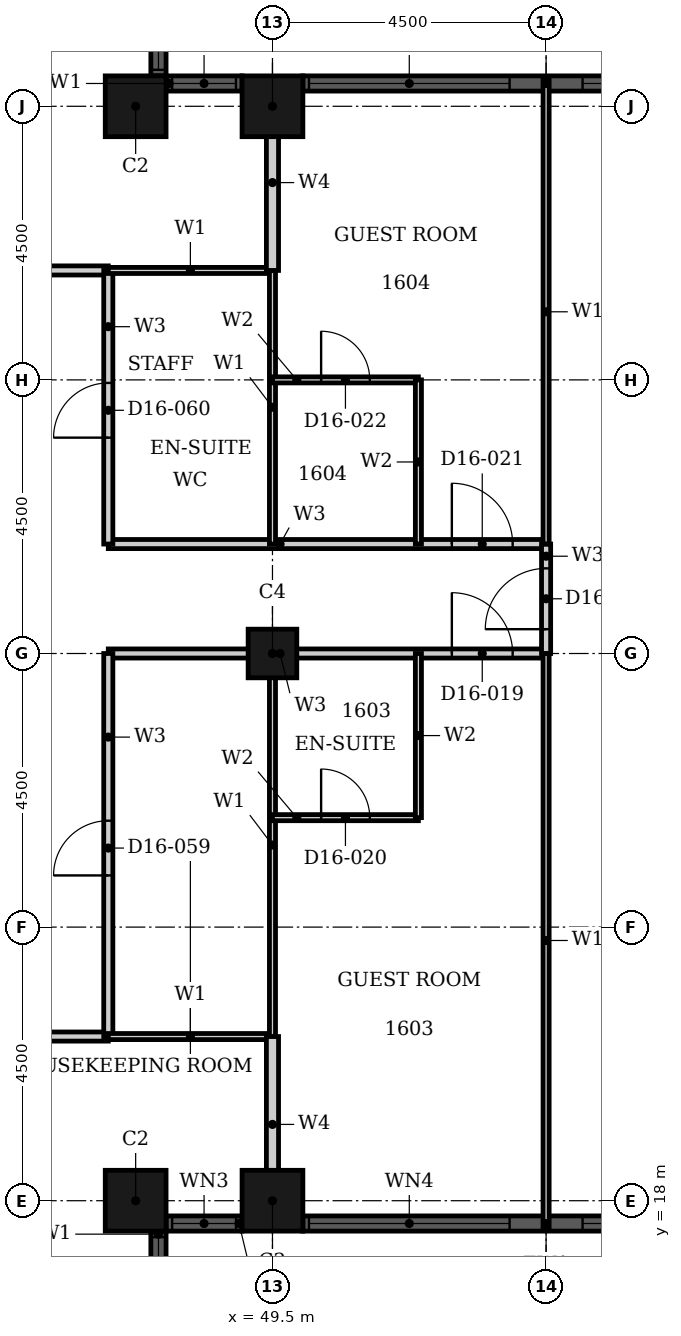
"""IFC4 building model, lengths in metres.
Left out: names, types, materials, properties, quantities, classifications, styles, units other than length and angle.
Written with IfcOpenShell. Run it as: python <this file> out.ifc"""

import sys

from ifc_helpers import new_model, si_unit, direction, frame, frame_2d, origin, origin_2d, place, context, subcontext, project, spatial, rectangle, hollow_rectangle, extrude, element, fill, save


model = new_model("IFC4")
c1 = context("Model", 3, precision=1e-05, world=origin(), true_north=direction((0.0, 1.0)))
c2 = subcontext(c1, "Body", "Model", "MODEL_VIEW")
j1 = project(units=[si_unit("LENGTHUNIT", "METRE"), si_unit("PLANEANGLEUNIT", "RADIAN")], contexts=[c1])
p1 = place(None, origin())
s1 = spatial("IfcSite", under=j1, at=p1, CompositionType="ELEMENT")
p2 = place(p1, origin())
s2 = spatial("IfcBuilding", under=s1, at=p2, CompositionType="ELEMENT")
p3 = place(p2, frame((0.0, 0.0, 70.8)))
s3 = spatial("IfcBuildingStorey", under=s2, at=p3, CompositionType="ELEMENT", Elevation=70.8)
for number, where, z_axis, x_axis in (
    (1, (47.25, 18.0, 0.0), (0.0, 0.0, 1.0), (1.0, 0.0, 0.0)),
    (2, (49.5, 18.0, 0.0), (0.0, 0.0, 1.0), (1.0, 0.0, 0.0)),
    (3, (49.5, 36.0, 0.0), (0.0, 0.0, 1.0), (1.0, 0.0, 0.0)),
    (4, (47.25, 36.0, 0.0), (0.0, 0.0, 1.0), (1.0, 0.0, 0.0)),
):
    element("IfcColumn", number, at=place(p3, frame(where, z_axis=z_axis, x_axis=x_axis)), inside=s3, PredefinedType="COLUMN", context=c2, shape_type="SweptSolid", body=[
        extrude(hollow_rectangle(XDim=1.0, YDim=1.0, WallThickness=0.032, at=origin_2d()), origin(), (0.0, 0.0, 1.0), 3.6),
    ])
p4 = place(p3, frame((49.5, 27.0, 0.0), z_axis=(0.0, 0.0, 1.0), x_axis=(1.0, 0.0, 0.0)))
e5 = element("IfcColumn", 5, at=p4, inside=s3, PredefinedType="COLUMN", context=c2, shape_type="SweptSolid", body=[
    extrude(hollow_rectangle(XDim=0.8, YDim=0.8, WallThickness=0.025, at=origin_2d()), origin(), (0.0, 0.0, 1.0), 3.6),
])
p5 = place(p3, frame((47.625, 16.25, 0.0), z_axis=(0.0, 0.0, 1.0), x_axis=(0.0, 1.0, 0.0)))
e6 = element("IfcWall", 6, at=p5, inside=s3, PredefinedType="SOLIDWALL", context=c2, shape_type="SweptSolid", body=[
    extrude(rectangle(XDim=1.25, YDim=0.25, at=frame_2d((0.625, 0.0))), origin(), (0.0, 0.0, 1.0), 3.6),
])
p6 = place(p5, frame((0.1, 0.0, 0.9)))
e7 = element("IfcOpeningElement", 7, at=p6, cuts=e6, PredefinedType="OPENING", context=c2, shape_type="SweptSolid", body=[
    extrude(rectangle(XDim=1.05, YDim=2.08, at=frame_2d((0.525, 1.04))), frame((0.0, 0.135, 0.0), z_axis=(0.0, -1.0, 0.0), x_axis=(1.0, 0.0, 0.0)), (0.0, 0.0, 1.0), 0.27),
])
p7 = place(p3, frame((47.75, 17.625, 0.0), z_axis=(0.0, 0.0, 1.0), x_axis=(1.0, 0.0, 0.0)))
e8 = element("IfcWall", 8, at=p7, inside=s3, PredefinedType="SOLIDWALL", context=c2, shape_type="SweptSolid", body=[
    extrude(rectangle(XDim=1.25, YDim=0.25, at=frame_2d((0.625, 0.0))), origin(), (0.0, 0.0, 1.0), 3.6),
])
p8 = place(p7, frame((0.1, 0.0, 0.9)))
e9 = element("IfcOpeningElement", 9, at=p8, cuts=e8, PredefinedType="OPENING", context=c2, shape_type="SweptSolid", body=[
    extrude(rectangle(XDim=1.05, YDim=2.08, at=frame_2d((0.525, 1.04))), frame((0.0, 0.135, 0.0), z_axis=(0.0, -1.0, 0.0), x_axis=(1.0, 0.0, 0.0)), (0.0, 0.0, 1.0), 0.27),
])
p9 = place(p3, frame((50.0, 17.625, 0.0), z_axis=(0.0, 0.0, 1.0), x_axis=(1.0, 0.0, 0.0)))
e10 = element("IfcWall", 10, at=p9, inside=s3, PredefinedType="SOLIDWALL", context=c2, shape_type="SweptSolid", body=[
    extrude(rectangle(XDim=8.0, YDim=0.25, at=frame_2d((4.0, 0.0))), origin(), (0.0, 0.0, 1.0), 3.6),
])
p10 = place(p9, frame((0.1, 0.0, 0.9)))
e11 = element("IfcOpeningElement", 11, at=p10, cuts=e10, PredefinedType="OPENING", context=c2, shape_type="SweptSolid", body=[
    extrude(rectangle(XDim=3.3, YDim=2.08, at=frame_2d((1.65, 1.04))), frame((0.0, 0.135, 0.0), z_axis=(0.0, -1.0, 0.0), x_axis=(1.0, 0.0, 0.0)), (0.0, 0.0, 1.0), 0.27),
])
p11 = place(p9, frame((4.6, 0.0, 0.9)))
e12 = element("IfcOpeningElement", 12, at=p11, cuts=e10, PredefinedType="OPENING", context=c2, shape_type="SweptSolid", body=[
    extrude(rectangle(XDim=3.3, YDim=2.08, at=frame_2d((1.65, 1.04))), frame((0.0, 0.135, 0.0), z_axis=(0.0, -1.0, 0.0), x_axis=(1.0, 0.0, 0.0)), (0.0, 0.0, 1.0), 0.27),
])
p12 = place(p3, frame((58.0, 36.375, 0.0), z_axis=(0.0, 0.0, 1.0), x_axis=(-1.0, 0.0, 0.0)))
e13 = element("IfcWall", 13, at=p12, inside=s3, PredefinedType="SOLIDWALL", context=c2, shape_type="SweptSolid", body=[
    extrude(rectangle(XDim=8.0, YDim=0.25, at=frame_2d((4.0, 0.0))), origin(), (0.0, 0.0, 1.0), 3.6),
])
p13 = place(p12, frame((0.1, 0.0, 0.9)))
e14 = element("IfcOpeningElement", 14, at=p13, cuts=e13, PredefinedType="OPENING", context=c2, shape_type="SweptSolid", body=[
    extrude(rectangle(XDim=3.3, YDim=2.08, at=frame_2d((1.65, 1.04))), frame((0.0, 0.135, 0.0), z_axis=(0.0, -1.0, 0.0), x_axis=(1.0, 0.0, 0.0)), (0.0, 0.0, 1.0), 0.27),
])
p14 = place(p12, frame((4.6, 0.0, 0.9)))
e15 = element("IfcOpeningElement", 15, at=p14, cuts=e13, PredefinedType="OPENING", context=c2, shape_type="SweptSolid", body=[
    extrude(rectangle(XDim=3.3, YDim=2.08, at=frame_2d((1.65, 1.04))), frame((0.0, 0.135, 0.0), z_axis=(0.0, -1.0, 0.0), x_axis=(1.0, 0.0, 0.0)), (0.0, 0.0, 1.0), 0.27),
])
p15 = place(p3, frame((49.0, 36.375, 0.0), z_axis=(0.0, 0.0, 1.0), x_axis=(-1.0, 0.0, 0.0)))
e16 = element("IfcWall", 16, at=p15, inside=s3, PredefinedType="SOLIDWALL", context=c2, shape_type="SweptSolid", body=[
    extrude(rectangle(XDim=1.25, YDim=0.25, at=frame_2d((0.625, 0.0))), origin(), (0.0, 0.0, 1.0), 3.6),
])
p16 = place(p15, frame((0.1, 0.0, 0.9)))
e17 = element("IfcOpeningElement", 17, at=p16, cuts=e16, PredefinedType="OPENING", context=c2, shape_type="SweptSolid", body=[
    extrude(rectangle(XDim=1.05, YDim=2.08, at=frame_2d((0.525, 1.04))), frame((0.0, 0.135, 0.0), z_axis=(0.0, -1.0, 0.0), x_axis=(1.0, 0.0, 0.0)), (0.0, 0.0, 1.0), 0.27),
])
p17 = place(p3, frame((47.625, 36.5, 0.0), z_axis=(0.0, 0.0, 1.0), x_axis=(0.0, 1.0, 0.0)))
e18 = element("IfcWall", 18, at=p17, inside=s3, PredefinedType="SOLIDWALL", context=c2, shape_type="SweptSolid", body=[
    extrude(rectangle(XDim=1.25, YDim=0.25, at=frame_2d((0.625, 0.0))), origin(), (0.0, 0.0, 1.0), 3.6),
])
p18 = place(p17, frame((0.1, 0.0, 0.9)))
e19 = element("IfcOpeningElement", 19, at=p18, cuts=e18, PredefinedType="OPENING", context=c2, shape_type="SweptSolid", body=[
    extrude(rectangle(XDim=1.05, YDim=2.08, at=frame_2d((0.525, 1.04))), frame((0.0, 0.135, 0.0), z_axis=(0.0, -1.0, 0.0), x_axis=(1.0, 0.0, 0.0)), (0.0, 0.0, 1.0), 0.27),
])
p19 = place(p3, frame((31.5, 20.7, 0.0), z_axis=(0.0, 0.0, 1.0), x_axis=(1.0, 0.0, 0.0)))
e20 = element("IfcWall", 20, at=p19, inside=s3, PredefinedType="PARTITIONING", context=c2, shape_type="SweptSolid", body=[
    extrude(rectangle(XDim=15.3, YDim=0.15, at=frame_2d((7.65, 0.0))), origin(), (0.0, 0.0, 1.0), 3.3),
])
p20 = place(p19, frame((11.95, 0.0, 0.0)))
e21 = element("IfcOpeningElement", 21, at=p20, cuts=e20, PredefinedType="OPENING", context=c2, shape_type="SweptSolid", body=[
    extrude(rectangle(XDim=1.0, YDim=2.1, at=frame_2d((0.5, 1.05))), frame((0.0, 0.085, 0.0), z_axis=(0.0, -1.0, 0.0), x_axis=(1.0, 0.0, 0.0)), (0.0, 0.0, 1.0), 0.17),
])
p21 = place(p19, frame((4.05, 0.0, 0.0)))
e22 = element("IfcOpeningElement", 22, at=p21, cuts=e20, PredefinedType="OPENING", context=c2, shape_type="SweptSolid", body=[
    extrude(rectangle(XDim=0.9, YDim=2.1, at=frame_2d((0.45, 1.05))), frame((0.0, 0.085, 0.0), z_axis=(0.0, -1.0, 0.0), x_axis=(1.0, 0.0, 0.0)), (0.0, 0.0, 1.0), 0.17),
])
p22 = place(p3, frame((46.8, 27.0, 0.0), z_axis=(0.0, 0.0, 1.0), x_axis=(1.0, 0.0, 0.0)))
e23 = element("IfcWall", 23, at=p22, inside=s3, PredefinedType="PARTITIONING", context=c2, shape_type="SweptSolid", body=[
    extrude(rectangle(XDim=7.2, YDim=0.15, at=frame_2d((3.6, 0.0))), origin(), (0.0, 0.0, 1.0), 2.58),
])
p23 = place(p22, frame((5.65, 0.0, 0.0)))
e24 = element("IfcOpeningElement", 24, at=p23, cuts=e23, PredefinedType="OPENING", context=c2, shape_type="SweptSolid", body=[
    extrude(rectangle(XDim=1.0, YDim=2.1, at=frame_2d((0.5, 1.05))), frame((0.0, 0.085, 0.0), z_axis=(0.0, -1.0, 0.0), x_axis=(1.0, 0.0, 0.0)), (0.0, 0.0, 1.0), 0.17),
])
p24 = place(p3, frame((46.8, 28.8, 0.0), z_axis=(0.0, 0.0, 1.0), x_axis=(1.0, 0.0, 0.0)))
e25 = element("IfcWall", 25, at=p24, inside=s3, PredefinedType="PARTITIONING", context=c2, shape_type="SweptSolid", body=[
    extrude(rectangle(XDim=7.2, YDim=0.15, at=frame_2d((3.6, 0.0))), origin(), (0.0, 0.0, 1.0), 3.3),
])
p25 = place(p24, frame((5.65, 0.0, 0.0)))
e26 = element("IfcOpeningElement", 26, at=p25, cuts=e25, PredefinedType="OPENING", context=c2, shape_type="SweptSolid", body=[
    extrude(rectangle(XDim=1.0, YDim=2.1, at=frame_2d((0.5, 1.05))), frame((0.0, 0.085, 0.0), z_axis=(0.0, -1.0, 0.0), x_axis=(1.0, 0.0, 0.0)), (0.0, 0.0, 1.0), 0.17),
])
p26 = place(p3, frame((33.3, 33.3, 0.0), z_axis=(0.0, 0.0, 1.0), x_axis=(1.0, 0.0, 0.0)))
e27 = element("IfcWall", 27, at=p26, inside=s3, PredefinedType="PARTITIONING", context=c2, shape_type="SweptSolid", body=[
    extrude(rectangle(XDim=13.5, YDim=0.15, at=frame_2d((6.75, 0.0))), origin(), (0.0, 0.0, 1.0), 3.3),
])
p27 = place(p26, frame((10.15, 0.0, 0.0)))
e28 = element("IfcOpeningElement", 28, at=p27, cuts=e27, PredefinedType="OPENING", context=c2, shape_type="SweptSolid", body=[
    extrude(rectangle(XDim=1.0, YDim=2.1, at=frame_2d((0.5, 1.05))), frame((0.0, 0.085, 0.0), z_axis=(0.0, -1.0, 0.0), x_axis=(1.0, 0.0, 0.0)), (0.0, 0.0, 1.0), 0.17),
])
p28 = place(p26, frame((3.15, 0.0, 0.0)))
e29 = element("IfcOpeningElement", 29, at=p28, cuts=e27, PredefinedType="OPENING", context=c2, shape_type="SweptSolid", body=[
    extrude(rectangle(XDim=0.9, YDim=2.1, at=frame_2d((0.45, 1.05))), frame((0.0, 0.085, 0.0), z_axis=(0.0, -1.0, 0.0), x_axis=(1.0, 0.0, 0.0)), (0.0, 0.0, 1.0), 0.17),
])
p29 = place(p3, frame((46.8, 28.8, 0.0), z_axis=(0.0, 0.0, 1.0), x_axis=(0.0, 1.0, 0.0)))
e30 = element("IfcWall", 30, at=p29, inside=s3, PredefinedType="PARTITIONING", context=c2, shape_type="SweptSolid", body=[
    extrude(rectangle(XDim=4.5, YDim=0.15, at=frame_2d((2.25, 0.0))), origin(), (0.0, 0.0, 1.0), 3.3),
])
p30 = place(p29, frame((1.75, 0.0, 0.0)))
e31 = element("IfcOpeningElement", 31, at=p30, cuts=e30, PredefinedType="OPENING", context=c2, shape_type="SweptSolid", body=[
    extrude(rectangle(XDim=0.9, YDim=2.1, at=frame_2d((0.45, 1.05))), frame((0.0, 0.085, 0.0), z_axis=(0.0, -1.0, 0.0), x_axis=(1.0, 0.0, 0.0)), (0.0, 0.0, 1.0), 0.17),
])
p31 = place(p3, frame((46.8, 20.7, 0.0), z_axis=(0.0, 0.0, 1.0), x_axis=(0.0, 1.0, 0.0)))
e32 = element("IfcWall", 32, at=p31, inside=s3, PredefinedType="PARTITIONING", context=c2, shape_type="SweptSolid", body=[
    extrude(rectangle(XDim=6.3, YDim=0.15, at=frame_2d((3.15, 0.0))), origin(), (0.0, 0.0, 1.0), 3.3),
])
p32 = place(p31, frame((2.65, 0.0, 0.0)))
e33 = element("IfcOpeningElement", 33, at=p32, cuts=e32, PredefinedType="OPENING", context=c2, shape_type="SweptSolid", body=[
    extrude(rectangle(XDim=0.9, YDim=2.1, at=frame_2d((0.45, 1.05))), frame((0.0, 0.085, 0.0), z_axis=(0.0, -1.0, 0.0), x_axis=(1.0, 0.0, 0.0)), (0.0, 0.0, 1.0), 0.17),
])
p33 = place(p3, frame((54.0, 27.0, 0.0), z_axis=(0.0, 0.0, 1.0), x_axis=(0.0, 1.0, 0.0)))
e34 = element("IfcWall", 34, at=p33, inside=s3, PredefinedType="PARTITIONING", context=c2, shape_type="SweptSolid", body=[
    extrude(rectangle(XDim=1.8, YDim=0.15, at=frame_2d((0.9, 0.0))), origin(), (0.0, 0.0, 1.0), 3.3),
])
p34 = place(p33, frame((0.4, 0.0, 0.0)))
e35 = element("IfcOpeningElement", 35, at=p34, cuts=e34, PredefinedType="OPENING", context=c2, shape_type="SweptSolid", body=[
    extrude(rectangle(XDim=1.0, YDim=2.1, at=frame_2d((0.5, 1.05))), frame((0.0, 0.085, 0.0), z_axis=(0.0, -1.0, 0.0), x_axis=(1.0, 0.0, 0.0)), (0.0, 0.0, 1.0), 0.17),
])
for number, where, z_axis, x_axis in (
    (36, (46.8, 20.7, 0.0), (0.0, 0.0, 1.0), (1.0, 0.0, 0.0)),
    (37, (46.8, 33.3, 0.0), (0.0, 0.0, 1.0), (1.0, 0.0, 0.0)),
):
    element("IfcWall", number, at=place(p3, frame(where, z_axis=z_axis, x_axis=x_axis)), inside=s3, PredefinedType="PARTITIONING", context=c2, shape_type="SweptSolid", body=[
        extrude(rectangle(XDim=2.7, YDim=0.1, at=frame_2d((1.35, 0.0))), origin(), (0.0, 0.0, 1.0), 3.3),
    ])
p35 = place(p3, frame((49.5, 28.8, 0.0), z_axis=(0.0, 0.0, 1.0), x_axis=(0.0, 1.0, 0.0)))
e38 = element("IfcWall", 38, at=p35, inside=s3, PredefinedType="PARTITIONING", context=c2, shape_type="SweptSolid", body=[
    extrude(rectangle(XDim=4.5, YDim=0.1, at=frame_2d((2.25, 0.0))), origin(), (0.0, 0.0, 1.0), 2.38),
])
p36 = place(p3, frame((49.5, 20.7, 0.0), z_axis=(0.0, 0.0, 1.0), x_axis=(0.0, 1.0, 0.0)))
e39 = element("IfcWall", 39, at=p36, inside=s3, PredefinedType="PARTITIONING", context=c2, shape_type="SweptSolid", body=[
    extrude(rectangle(XDim=6.3, YDim=0.1, at=frame_2d((3.15, 0.0))), origin(), (0.0, 0.0, 1.0), 2.38),
])
p37 = place(p3, frame((54.0, 28.8, 0.0), z_axis=(0.0, 0.0, 1.0), x_axis=(0.0, 1.0, 0.0)))
e40 = element("IfcWall", 40, at=p37, inside=s3, PredefinedType="PARTITIONING", context=c2, shape_type="SweptSolid", body=[
    extrude(rectangle(XDim=7.64, YDim=0.1, at=frame_2d((3.82, 0.0))), origin(), (0.0, 0.0, 1.0), 3.3),
])
p38 = place(p3, frame((54.0, 17.56, 0.0), z_axis=(0.0, 0.0, 1.0), x_axis=(0.0, 1.0, 0.0)))
e41 = element("IfcWall", 41, at=p38, inside=s3, PredefinedType="PARTITIONING", context=c2, shape_type="SweptSolid", body=[
    extrude(rectangle(XDim=9.44, YDim=0.1, at=frame_2d((4.72, 0.0))), origin(), (0.0, 0.0, 1.0), 3.3),
])
for number, where, z_axis, x_axis in (
    (42, (49.5, 33.3, 0.0), (0.0, 0.0, 1.0), (0.0, 1.0, 0.0)),
    (43, (49.5, 17.81, 0.0), (0.0, 0.0, 1.0), (0.0, 1.0, 0.0)),
):
    element("IfcWall", number, at=place(p3, frame(where, z_axis=z_axis, x_axis=x_axis)), inside=s3, PredefinedType="PARTITIONING", context=c2, shape_type="SweptSolid", body=[
        extrude(rectangle(XDim=2.89, YDim=0.2, at=frame_2d((1.445, 0.0))), origin(), (0.0, 0.0, 1.0), 2.38),
    ])
p39 = place(p3, frame((49.5, 24.3, 0.0), z_axis=(0.0, 0.0, 1.0), x_axis=(1.0, 0.0, 0.0)))
e44 = element("IfcWall", 44, at=p39, inside=s3, PredefinedType="PARTITIONING", context=c2, shape_type="SweptSolid", body=[
    extrude(rectangle(XDim=2.4, YDim=0.1, at=frame_2d((1.2, 0.0))), origin(), (0.0, 0.0, 1.0), 3.3),
])
p40 = place(p39, frame((0.8, 0.0, 0.0)))
e45 = element("IfcOpeningElement", 45, at=p40, cuts=e44, PredefinedType="OPENING", context=c2, shape_type="SweptSolid", body=[
    extrude(rectangle(XDim=0.8, YDim=2.1, at=frame_2d((0.4, 1.05))), frame((0.0, 0.06, 0.0), z_axis=(0.0, -1.0, 0.0), x_axis=(1.0, 0.0, 0.0)), (0.0, 0.0, 1.0), 0.12),
])
p41 = place(p3, frame((49.5, 31.5, 0.0), z_axis=(0.0, 0.0, 1.0), x_axis=(1.0, 0.0, 0.0)))
e46 = element("IfcWall", 46, at=p41, inside=s3, PredefinedType="PARTITIONING", context=c2, shape_type="SweptSolid", body=[
    extrude(rectangle(XDim=2.4, YDim=0.1, at=frame_2d((1.2, 0.0))), origin(), (0.0, 0.0, 1.0), 2.58),
])
p42 = place(p41, frame((0.8, 0.0, 0.0)))
e47 = element("IfcOpeningElement", 47, at=p42, cuts=e46, PredefinedType="OPENING", context=c2, shape_type="SweptSolid", body=[
    extrude(rectangle(XDim=0.8, YDim=2.1, at=frame_2d((0.4, 1.05))), frame((0.0, 0.06, 0.0), z_axis=(0.0, -1.0, 0.0), x_axis=(1.0, 0.0, 0.0)), (0.0, 0.0, 1.0), 0.12),
])
for number, where, z_axis, x_axis in (
    (48, (51.9, 28.8, 0.0), (0.0, 0.0, 1.0), (0.0, 1.0, 0.0)),
    (49, (51.9, 24.3, 0.0), (0.0, 0.0, 1.0), (0.0, 1.0, 0.0)),
):
    element("IfcWall", number, at=place(p3, frame(where, z_axis=z_axis, x_axis=x_axis)), inside=s3, PredefinedType="PARTITIONING", context=c2, shape_type="SweptSolid", body=[
        extrude(rectangle(XDim=2.7, YDim=0.1, at=frame_2d((1.35, 0.0))), origin(), (0.0, 0.0, 1.0), 3.3),
    ])
p43 = place(p6, origin())
e50 = element("IfcWindow", 50, at=p43, inside=s3, PartitioningType="SINGLE_PANEL", PredefinedType="WINDOW", context=c2, shape_type="SweptSolid", body=[
    extrude(rectangle(XDim=1.05, YDim=2.08, at=frame_2d((0.525, 1.04))), frame((0.0, 0.03, 0.0), z_axis=(0.0, -1.0, 0.0), x_axis=(1.0, 0.0, 0.0)), (0.0, 0.0, 1.0), 0.06),
])
fill(e7, e50)
p44 = place(p8, origin())
e51 = element("IfcWindow", 51, at=p44, inside=s3, PartitioningType="SINGLE_PANEL", PredefinedType="WINDOW", context=c2, shape_type="SweptSolid", body=[
    extrude(rectangle(XDim=1.05, YDim=2.08, at=frame_2d((0.525, 1.04))), frame((0.0, 0.03, 0.0), z_axis=(0.0, -1.0, 0.0), x_axis=(1.0, 0.0, 0.0)), (0.0, 0.0, 1.0), 0.06),
])
fill(e9, e51)
p45 = place(p10, origin())
e52 = element("IfcWindow", 52, at=p45, inside=s3, PartitioningType="SINGLE_PANEL", PredefinedType="WINDOW", context=c2, shape_type="SweptSolid", body=[
    extrude(rectangle(XDim=3.3, YDim=2.08, at=frame_2d((1.65, 1.04))), frame((0.0, 0.03, 0.0), z_axis=(0.0, -1.0, 0.0), x_axis=(1.0, 0.0, 0.0)), (0.0, 0.0, 1.0), 0.06),
])
fill(e11, e52)
p46 = place(p11, origin())
e53 = element("IfcWindow", 53, at=p46, inside=s3, PartitioningType="SINGLE_PANEL", PredefinedType="WINDOW", context=c2, shape_type="SweptSolid", body=[
    extrude(rectangle(XDim=3.3, YDim=2.08, at=frame_2d((1.65, 1.04))), frame((0.0, 0.03, 0.0), z_axis=(0.0, -1.0, 0.0), x_axis=(1.0, 0.0, 0.0)), (0.0, 0.0, 1.0), 0.06),
])
fill(e12, e53)
p47 = place(p13, origin())
e54 = element("IfcWindow", 54, at=p47, inside=s3, PartitioningType="SINGLE_PANEL", PredefinedType="WINDOW", context=c2, shape_type="SweptSolid", body=[
    extrude(rectangle(XDim=3.3, YDim=2.08, at=frame_2d((1.65, 1.04))), frame((0.0, 0.03, 0.0), z_axis=(0.0, -1.0, 0.0), x_axis=(1.0, 0.0, 0.0)), (0.0, 0.0, 1.0), 0.06),
])
fill(e14, e54)
p48 = place(p14, origin())
e55 = element("IfcWindow", 55, at=p48, inside=s3, PartitioningType="SINGLE_PANEL", PredefinedType="WINDOW", context=c2, shape_type="SweptSolid", body=[
    extrude(rectangle(XDim=3.3, YDim=2.08, at=frame_2d((1.65, 1.04))), frame((0.0, 0.03, 0.0), z_axis=(0.0, -1.0, 0.0), x_axis=(1.0, 0.0, 0.0)), (0.0, 0.0, 1.0), 0.06),
])
fill(e15, e55)
p49 = place(p16, origin())
e56 = element("IfcWindow", 56, at=p49, inside=s3, PartitioningType="SINGLE_PANEL", PredefinedType="WINDOW", context=c2, shape_type="SweptSolid", body=[
    extrude(rectangle(XDim=1.05, YDim=2.08, at=frame_2d((0.525, 1.04))), frame((0.0, 0.03, 0.0), z_axis=(0.0, -1.0, 0.0), x_axis=(1.0, 0.0, 0.0)), (0.0, 0.0, 1.0), 0.06),
])
fill(e17, e56)
p50 = place(p18, origin())
e57 = element("IfcWindow", 57, at=p50, inside=s3, PartitioningType="SINGLE_PANEL", PredefinedType="WINDOW", context=c2, shape_type="SweptSolid", body=[
    extrude(rectangle(XDim=1.05, YDim=2.08, at=frame_2d((0.525, 1.04))), frame((0.0, 0.03, 0.0), z_axis=(0.0, -1.0, 0.0), x_axis=(1.0, 0.0, 0.0)), (0.0, 0.0, 1.0), 0.06),
])
fill(e19, e57)
p51 = place(p23, origin())
e58 = element("IfcDoor", 58, at=p51, inside=s3, OperationType="SINGLE_SWING_RIGHT", PredefinedType="DOOR", context=c2, shape_type="SweptSolid", body=[
    extrude(rectangle(XDim=1.0, YDim=2.1, at=frame_2d((0.5, 1.05))), frame((0.0, 0.025, 0.0), z_axis=(0.0, -1.0, 0.0), x_axis=(1.0, 0.0, 0.0)), (0.0, 0.0, 1.0), 0.05),
])
fill(e24, e58)
p52 = place(p40, origin())
e59 = element("IfcDoor", 59, at=p52, inside=s3, OperationType="SINGLE_SWING_LEFT", PredefinedType="DOOR", context=c2, shape_type="SweptSolid", body=[
    extrude(rectangle(XDim=0.8, YDim=2.1, at=frame_2d((0.4, 1.05))), frame((0.0, 0.025, 0.0), z_axis=(0.0, -1.0, 0.0), x_axis=(1.0, 0.0, 0.0)), (0.0, 0.0, 1.0), 0.05),
])
fill(e45, e59)
p53 = place(p25, origin())
e60 = element("IfcDoor", 60, at=p53, inside=s3, OperationType="SINGLE_SWING_RIGHT", PredefinedType="DOOR", context=c2, shape_type="SweptSolid", body=[
    extrude(rectangle(XDim=1.0, YDim=2.1, at=frame_2d((0.5, 1.05))), frame((0.0, 0.025, 0.0), z_axis=(0.0, -1.0, 0.0), x_axis=(1.0, 0.0, 0.0)), (0.0, 0.0, 1.0), 0.05),
])
fill(e26, e60)
p54 = place(p42, origin())
e61 = element("IfcDoor", 61, at=p54, inside=s3, OperationType="SINGLE_SWING_LEFT", PredefinedType="DOOR", context=c2, shape_type="SweptSolid", body=[
    extrude(rectangle(XDim=0.8, YDim=2.1, at=frame_2d((0.4, 1.05))), frame((0.0, 0.025, 0.0), z_axis=(0.0, -1.0, 0.0), x_axis=(1.0, 0.0, 0.0)), (0.0, 0.0, 1.0), 0.05),
])
fill(e47, e61)
p55 = place(p34, origin())
e62 = element("IfcDoor", 62, at=p55, inside=s3, OperationType="SINGLE_SWING_LEFT", PredefinedType="DOOR", context=c2, shape_type="SweptSolid", body=[
    extrude(rectangle(XDim=1.0, YDim=2.1, at=frame_2d((0.5, 1.05))), frame((0.0, 0.025, 0.0), z_axis=(0.0, -1.0, 0.0), x_axis=(1.0, 0.0, 0.0)), (0.0, 0.0, 1.0), 0.05),
])
fill(e35, e62)
p56 = place(p32, origin())
e63 = element("IfcDoor", 63, at=p56, inside=s3, OperationType="SINGLE_SWING_LEFT", PredefinedType="DOOR", context=c2, shape_type="SweptSolid", body=[
    extrude(rectangle(XDim=0.9, YDim=2.1, at=frame_2d((0.45, 1.05))), frame((0.0, 0.025, 0.0), z_axis=(0.0, -1.0, 0.0), x_axis=(1.0, 0.0, 0.0)), (0.0, 0.0, 1.0), 0.05),
])
fill(e33, e63)
p57 = place(p30, origin())
e64 = element("IfcDoor", 64, at=p57, inside=s3, OperationType="SINGLE_SWING_RIGHT", PredefinedType="DOOR", context=c2, shape_type="SweptSolid", body=[
    extrude(rectangle(XDim=0.9, YDim=2.1, at=frame_2d((0.45, 1.05))), frame((0.0, 0.025, 0.0), z_axis=(0.0, -1.0, 0.0), x_axis=(1.0, 0.0, 0.0)), (0.0, 0.0, 1.0), 0.05),
])
fill(e31, e64)
save(model, sys.argv[1])
